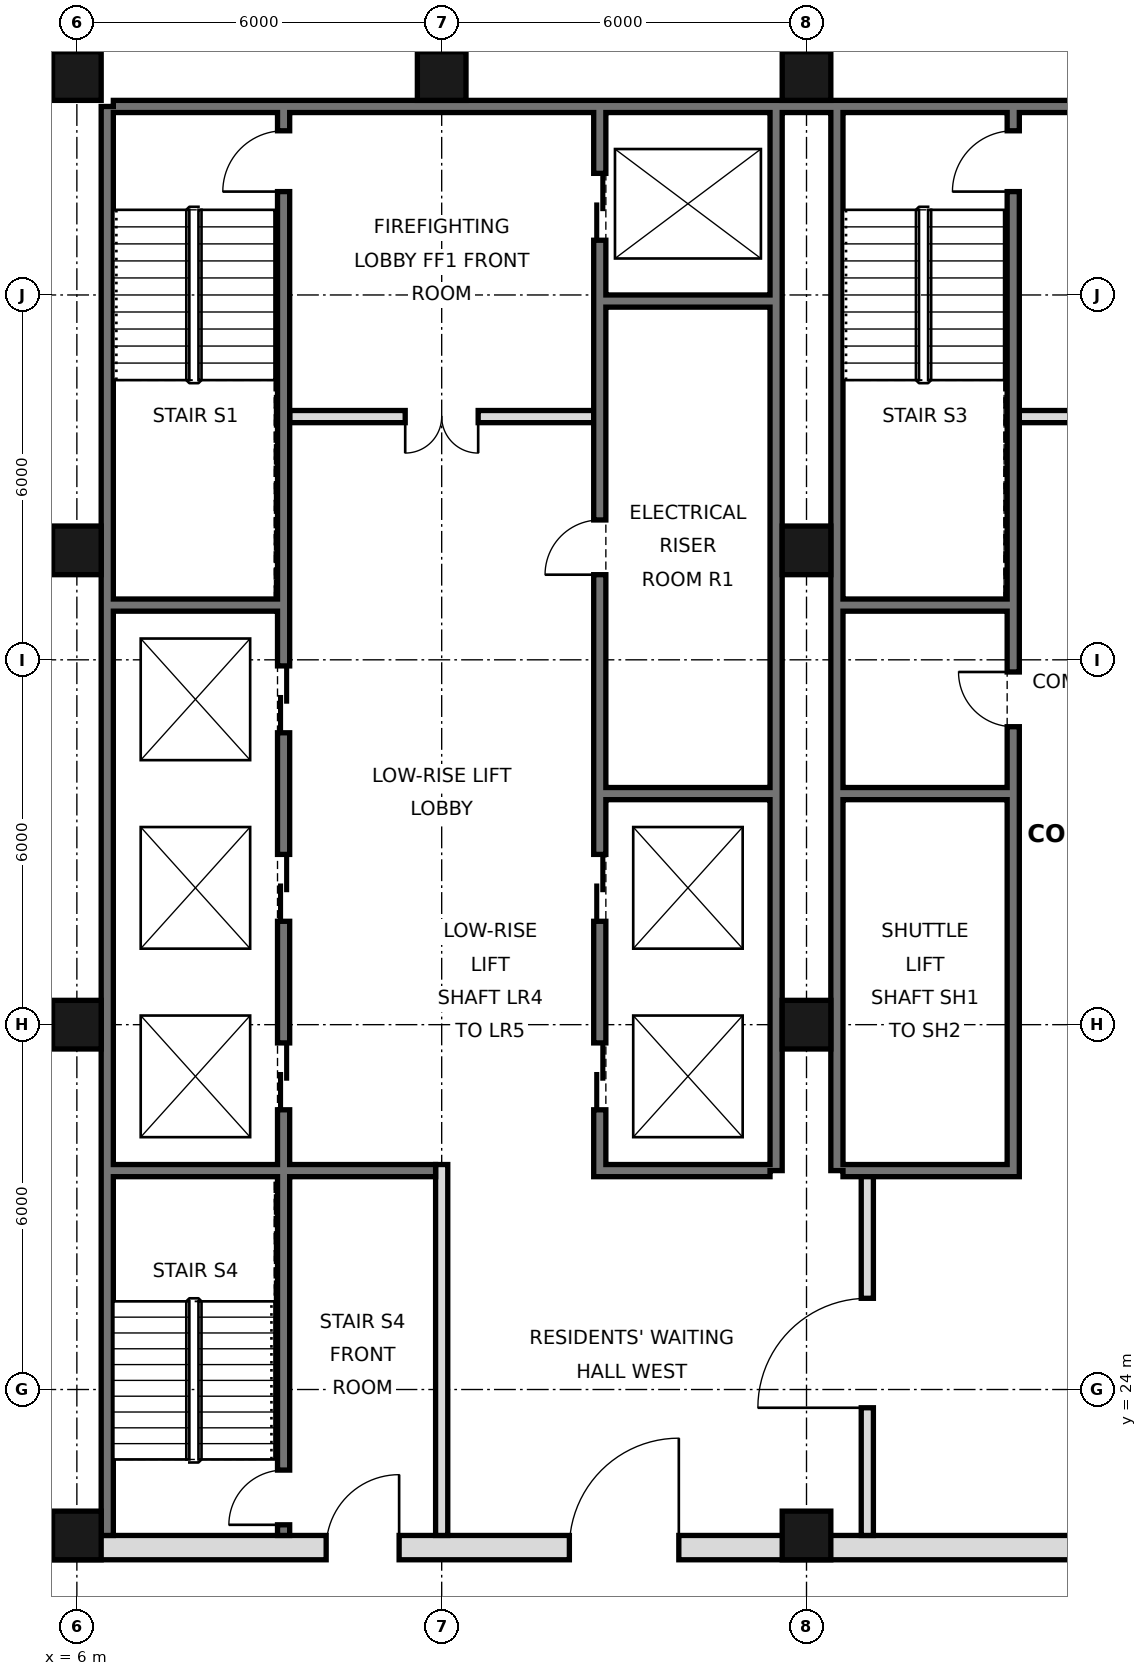
"""IFC4 building model, lengths in metres.
Left out: names, types, materials, properties, quantities, classifications, styles, units other than length and angle.
Written with IfcOpenShell. Run it as: python <this file> out.ifc"""

import sys

from ifc_helpers import new_model, si_unit, direction, frame, frame_2d, origin, origin_2d, place, context, subcontext, project, spatial, rectangle, hollow_rectangle, extrude, element, fill, save


model = new_model("IFC4")
c1 = context("Model", 3, precision=1e-05, world=origin(), true_north=direction((0.0, 1.0)))
c2 = subcontext(c1, "Body", "Model", "MODEL_VIEW")
j1 = project(units=[si_unit("LENGTHUNIT", "METRE"), si_unit("PLANEANGLEUNIT", "RADIAN")], contexts=[c1])
p1 = place(None, origin())
s1 = spatial("IfcSite", under=j1, at=p1, CompositionType="ELEMENT")
p2 = place(p1, origin())
s2 = spatial("IfcBuilding", under=s1, at=p2, CompositionType="ELEMENT")
p3 = place(p2, frame((0.0, 0.0, 126.8)))
s3 = spatial("IfcBuildingStorey", under=s2, at=p3, CompositionType="ELEMENT", Elevation=126.8)
for number, where, z_axis, x_axis in (
    (1, (6.0, 21.6, 0.0), (0.0, 0.0, 1.0), (1.0, 0.0, 0.0)),
    (2, (6.0, 30.0, 0.0), (0.0, 0.0, 1.0), (1.0, 0.0, 0.0)),
    (3, (6.0, 37.8, 0.0), (0.0, 0.0, 1.0), (1.0, 0.0, 0.0)),
    (4, (6.0, 45.6, 0.0), (0.0, 0.0, 1.0), (1.0, 0.0, 0.0)),
    (5, (12.0, 45.6, 0.0), (0.0, 0.0, 1.0), (1.0, 0.0, 0.0)),
    (6, (18.0, 21.6, 0.0), (0.0, 0.0, 1.0), (1.0, 0.0, 0.0)),
    (7, (18.0, 30.0, 0.0), (0.0, 0.0, 1.0), (1.0, 0.0, 0.0)),
    (8, (18.0, 37.8, 0.0), (0.0, 0.0, 1.0), (1.0, 0.0, 0.0)),
    (9, (18.0, 45.6, 0.0), (0.0, 0.0, 1.0), (1.0, 0.0, 0.0)),
):
    element("IfcColumn", number, at=place(p3, frame(where, z_axis=z_axis, x_axis=x_axis)), inside=s3, PredefinedType="COLUMN", context=c2, shape_type="SweptSolid", body=[
        extrude(hollow_rectangle(XDim=0.8, YDim=0.8, WallThickness=0.05, at=origin_2d()), origin(), (0.0, 0.0, 1.0), 3.6),
    ])
p4 = place(p3, frame((6.5, 21.6, 0.0), z_axis=(0.0, 0.0, 1.0), x_axis=(0.0, 1.0, 0.0)))
e10 = element("IfcWall", 10, at=p4, inside=s3, PredefinedType="SOLIDWALL", context=c2, shape_type="SweptSolid", body=[
    extrude(rectangle(XDim=23.5, YDim=0.2, at=frame_2d((11.75, 0.0))), origin(), (0.0, 0.0, 1.0), 3.42),
])
p5 = place(p3, frame((6.6, 45.1, 0.0), z_axis=(0.0, 0.0, 1.0), x_axis=(1.0, 0.0, 0.0)))
e11 = element("IfcWall", 11, at=p5, inside=s3, PredefinedType="SOLIDWALL", context=c2, shape_type="SweptSolid", body=[
    extrude(rectangle(XDim=34.8, YDim=0.2, at=frame_2d((17.4, 0.0))), origin(), (0.0, 0.0, 1.0), 3.42),
])
for number, where, z_axis, x_axis in (
    (12, (17.5, 27.6, 0.0), (0.0, 0.0, 1.0), (0.0, 1.0, 0.0)),
    (13, (18.5, 27.6, 0.0), (0.0, 0.0, 1.0), (0.0, 1.0, 0.0)),
):
    element("IfcWall", number, at=place(p3, frame(where, z_axis=z_axis, x_axis=x_axis)), inside=s3, PredefinedType="SOLIDWALL", context=c2, shape_type="SweptSolid", body=[
        extrude(rectangle(XDim=17.5, YDim=0.2, at=frame_2d((8.75, 0.0))), origin(), (0.0, 0.0, 1.0), 3.42),
    ])
p6 = place(p3, frame((5.6, 21.4, 0.0), z_axis=(0.0, 0.0, 1.0), x_axis=(1.0, 0.0, 0.0)))
e14 = element("IfcWall", 14, at=p6, inside=s3, PredefinedType="SOLIDWALL", context=c2, shape_type="SweptSolid", body=[
    extrude(rectangle(XDim=36.8, YDim=0.4, at=frame_2d((18.4, 0.0))), origin(), (0.0, 0.0, 1.0), 3.42),
])
p7 = place(p6, frame((8.5, 0.0, 0.0)))
e15 = element("IfcOpeningElement", 15, at=p7, cuts=e14, PredefinedType="OPENING", context=c2, shape_type="SweptSolid", body=[
    extrude(rectangle(XDim=1.8, YDim=2.1, at=frame_2d((0.9, 1.05))), frame((0.0, 0.21, 0.0), z_axis=(0.0, -1.0, 0.0), x_axis=(1.0, 0.0, 0.0)), (0.0, 0.0, 1.0), 0.42),
])
p8 = place(p6, frame((17.5, 0.0, 0.0)))
e16 = element("IfcOpeningElement", 16, at=p8, cuts=e14, PredefinedType="OPENING", context=c2, shape_type="SweptSolid", body=[
    extrude(rectangle(XDim=1.8, YDim=2.1, at=frame_2d((0.9, 1.05))), frame((0.0, 0.21, 0.0), z_axis=(0.0, -1.0, 0.0), x_axis=(1.0, 0.0, 0.0)), (0.0, 0.0, 1.0), 0.42),
])
p9 = place(p6, frame((26.5, 0.0, 0.0)))
e17 = element("IfcOpeningElement", 17, at=p9, cuts=e14, PredefinedType="OPENING", context=c2, shape_type="SweptSolid", body=[
    extrude(rectangle(XDim=1.8, YDim=2.1, at=frame_2d((0.9, 1.05))), frame((0.0, 0.21, 0.0), z_axis=(0.0, -1.0, 0.0), x_axis=(1.0, 0.0, 0.0)), (0.0, 0.0, 1.0), 0.42),
])
p10 = place(p6, frame((4.5, 0.0, 0.0)))
e18 = element("IfcOpeningElement", 18, at=p10, cuts=e14, PredefinedType="OPENING", context=c2, shape_type="SweptSolid", body=[
    extrude(rectangle(XDim=1.2, YDim=2.1, at=frame_2d((0.6, 1.05))), frame((0.0, 0.21, 0.0), z_axis=(0.0, -1.0, 0.0), x_axis=(1.0, 0.0, 0.0)), (0.0, 0.0, 1.0), 0.42),
])
p11 = place(p6, frame((31.1, 0.0, 0.0)))
e19 = element("IfcOpeningElement", 19, at=p11, cuts=e14, PredefinedType="OPENING", context=c2, shape_type="SweptSolid", body=[
    extrude(rectangle(XDim=1.2, YDim=2.1, at=frame_2d((0.6, 1.05))), frame((0.0, 0.21, 0.0), z_axis=(0.0, -1.0, 0.0), x_axis=(1.0, 0.0, 0.0)), (0.0, 0.0, 1.0), 0.42),
])
p12 = place(p3, frame((19.0, 21.6, 0.0), z_axis=(0.0, 0.0, 1.0), x_axis=(0.0, 1.0, 0.0)))
e20 = element("IfcWall", 20, at=p12, inside=s3, PredefinedType="PARTITIONING", context=c2, shape_type="SweptSolid", body=[
    extrude(rectangle(XDim=6.0, YDim=0.2, at=frame_2d((3.0, 0.0))), origin(), (0.0, 0.0, 1.0), 3.42),
])
p13 = place(p12, frame((2.1, 0.0, 0.0)))
e21 = element("IfcOpeningElement", 21, at=p13, cuts=e20, PredefinedType="OPENING", context=c2, shape_type="SweptSolid", body=[
    extrude(rectangle(XDim=1.8, YDim=2.1, at=frame_2d((0.9, 1.05))), frame((0.0, 0.11, 0.0), z_axis=(0.0, -1.0, 0.0), x_axis=(1.0, 0.0, 0.0)), (0.0, 0.0, 1.0), 0.22),
])
p14 = place(p3, frame((12.0, 21.6, 0.0), z_axis=(0.0, 0.0, 1.0), x_axis=(0.0, 1.0, 0.0)))
e22 = element("IfcWall", 22, at=p14, inside=s3, PredefinedType="PARTITIONING", context=c2, shape_type="SweptSolid", body=[
    extrude(rectangle(XDim=6.1, YDim=0.2, at=frame_2d((3.05, 0.0))), origin(), (0.0, 0.0, 1.0), 3.42),
])
p15 = place(p3, frame((14.6, 27.5, 0.0), z_axis=(0.0, 0.0, 1.0), x_axis=(0.0, 1.0, 0.0)))
e23 = element("IfcWall", 23, at=p15, inside=s3, PredefinedType="SOLIDWALL", context=c2, shape_type="SweptSolid", body=[
    extrude(rectangle(XDim=17.5, YDim=0.2, at=frame_2d((8.75, 0.0))), origin(), (0.0, 0.0, 1.0), 3.42),
])
p16 = place(p15, frame((1.1, 0.0, 0.0)))
e24 = element("IfcOpeningElement", 24, at=p16, cuts=e23, PredefinedType="OPENING", context=c2, shape_type="SweptSolid", body=[
    extrude(rectangle(XDim=1.1, YDim=2.1, at=frame_2d((0.55, 1.05))), frame((0.0, 0.11, 0.0), z_axis=(0.0, -1.0, 0.0), x_axis=(1.0, 0.0, 0.0)), (0.0, 0.0, 1.0), 0.22),
])
p17 = place(p15, frame((4.2, 0.0, 0.0)))
e25 = element("IfcOpeningElement", 25, at=p17, cuts=e23, PredefinedType="OPENING", context=c2, shape_type="SweptSolid", body=[
    extrude(rectangle(XDim=1.1, YDim=2.1, at=frame_2d((0.55, 1.05))), frame((0.0, 0.11, 0.0), z_axis=(0.0, -1.0, 0.0), x_axis=(1.0, 0.0, 0.0)), (0.0, 0.0, 1.0), 0.22),
])
p18 = place(p15, frame((15.4, 0.0, 0.0)))
e26 = element("IfcOpeningElement", 26, at=p18, cuts=e23, PredefinedType="OPENING", context=c2, shape_type="SweptSolid", body=[
    extrude(rectangle(XDim=1.1, YDim=2.1, at=frame_2d((0.55, 1.05))), frame((0.0, 0.11, 0.0), z_axis=(0.0, -1.0, 0.0), x_axis=(1.0, 0.0, 0.0)), (0.0, 0.0, 1.0), 0.22),
])
p19 = place(p15, frame((9.9, 0.0, 0.0)))
e27 = element("IfcOpeningElement", 27, at=p19, cuts=e23, PredefinedType="OPENING", context=c2, shape_type="SweptSolid", body=[
    extrude(rectangle(XDim=0.9, YDim=2.1, at=frame_2d((0.45, 1.05))), frame((0.0, 0.11, 0.0), z_axis=(0.0, -1.0, 0.0), x_axis=(1.0, 0.0, 0.0)), (0.0, 0.0, 1.0), 0.22),
])
p20 = place(p3, frame((21.4, 27.5, 0.0), z_axis=(0.0, 0.0, 1.0), x_axis=(0.0, 1.0, 0.0)))
e28 = element("IfcWall", 28, at=p20, inside=s3, PredefinedType="SOLIDWALL", context=c2, shape_type="SweptSolid", body=[
    extrude(rectangle(XDim=17.5, YDim=0.2, at=frame_2d((8.75, 0.0))), origin(), (0.0, 0.0, 1.0), 3.42),
])
p21 = place(p20, frame((16.2, 0.0, 0.0)))
e29 = element("IfcOpeningElement", 29, at=p21, cuts=e28, PredefinedType="OPENING", context=c2, shape_type="SweptSolid", body=[
    extrude(rectangle(XDim=1.0, YDim=2.1, at=frame_2d((0.5, 1.05))), frame((0.0, 0.11, 0.0), z_axis=(0.0, -1.0, 0.0), x_axis=(1.0, 0.0, 0.0)), (0.0, 0.0, 1.0), 0.22),
])
p22 = place(p20, frame((7.4, 0.0, 0.0)))
e30 = element("IfcOpeningElement", 30, at=p22, cuts=e28, PredefinedType="OPENING", context=c2, shape_type="SweptSolid", body=[
    extrude(rectangle(XDim=0.9, YDim=2.1, at=frame_2d((0.45, 1.05))), frame((0.0, 0.11, 0.0), z_axis=(0.0, -1.0, 0.0), x_axis=(1.0, 0.0, 0.0)), (0.0, 0.0, 1.0), 0.22),
])
p23 = place(p3, frame((9.4, 21.6, 0.0), z_axis=(0.0, 0.0, 1.0), x_axis=(0.0, 1.0, 0.0)))
e31 = element("IfcWall", 31, at=p23, inside=s3, PredefinedType="SOLIDWALL", context=c2, shape_type="SweptSolid", body=[
    extrude(rectangle(XDim=23.4, YDim=0.2, at=frame_2d((11.7, 0.0))), origin(), (0.0, 0.0, 1.0), 3.42),
])
p24 = place(p23, frame((7.0, 0.0, 0.0)))
e32 = element("IfcOpeningElement", 32, at=p24, cuts=e31, PredefinedType="OPENING", context=c2, shape_type="SweptSolid", body=[
    extrude(rectangle(XDim=1.1, YDim=2.1, at=frame_2d((0.55, 1.05))), frame((0.0, 0.11, 0.0), z_axis=(0.0, -1.0, 0.0), x_axis=(1.0, 0.0, 0.0)), (0.0, 0.0, 1.0), 0.22),
])
p25 = place(p23, frame((10.1, 0.0, 0.0)))
e33 = element("IfcOpeningElement", 33, at=p25, cuts=e31, PredefinedType="OPENING", context=c2, shape_type="SweptSolid", body=[
    extrude(rectangle(XDim=1.1, YDim=2.1, at=frame_2d((0.55, 1.05))), frame((0.0, 0.11, 0.0), z_axis=(0.0, -1.0, 0.0), x_axis=(1.0, 0.0, 0.0)), (0.0, 0.0, 1.0), 0.22),
])
p26 = place(p23, frame((13.2, 0.0, 0.0)))
e34 = element("IfcOpeningElement", 34, at=p26, cuts=e31, PredefinedType="OPENING", context=c2, shape_type="SweptSolid", body=[
    extrude(rectangle(XDim=1.1, YDim=2.1, at=frame_2d((0.55, 1.05))), frame((0.0, 0.11, 0.0), z_axis=(0.0, -1.0, 0.0), x_axis=(1.0, 0.0, 0.0)), (0.0, 0.0, 1.0), 0.22),
])
p27 = place(p23, frame((22.1, 0.0, 0.0)))
e35 = element("IfcOpeningElement", 35, at=p27, cuts=e31, PredefinedType="OPENING", context=c2, shape_type="SweptSolid", body=[
    extrude(rectangle(XDim=1.0, YDim=2.1, at=frame_2d((0.5, 1.05))), frame((0.0, 0.11, 0.0), z_axis=(0.0, -1.0, 0.0), x_axis=(1.0, 0.0, 0.0)), (0.0, 0.0, 1.0), 0.22),
])
p28 = place(p23, frame((0.175, 0.0, 0.0)))
e36 = element("IfcOpeningElement", 36, at=p28, cuts=e31, PredefinedType="OPENING", context=c2, shape_type="SweptSolid", body=[
    extrude(rectangle(XDim=0.9, YDim=2.1, at=frame_2d((0.45, 1.05))), frame((0.0, 0.11, 0.0), z_axis=(0.0, -1.0, 0.0), x_axis=(1.0, 0.0, 0.0)), (0.0, 0.0, 1.0), 0.22),
])
for number, where, z_axis, x_axis in (
    (37, (14.7, 27.6, 0.0), (0.0, 0.0, 1.0), (1.0, 0.0, 0.0)),
    (38, (18.6, 27.6, 0.0), (0.0, 0.0, 1.0), (1.0, 0.0, 0.0)),
):
    element("IfcWall", number, at=place(p3, frame(where, z_axis=z_axis, x_axis=x_axis)), inside=s3, PredefinedType="SOLIDWALL", context=c2, shape_type="SweptSolid", body=[
        extrude(rectangle(XDim=2.7, YDim=0.2, at=frame_2d((1.35, 0.0))), origin(), (0.0, 0.0, 1.0), 3.42),
    ])
p29 = place(p3, frame((6.6, 27.6, 0.0), z_axis=(0.0, 0.0, 1.0), x_axis=(1.0, 0.0, 0.0)))
e39 = element("IfcWall", 39, at=p29, inside=s3, PredefinedType="SOLIDWALL", context=c2, shape_type="SweptSolid", body=[
    extrude(rectangle(XDim=5.3, YDim=0.2, at=frame_2d((2.65, 0.0))), origin(), (0.0, 0.0, 1.0), 3.42),
])
for number, where, z_axis, x_axis in (
    (40, (14.7, 33.8, 0.0), (0.0, 0.0, 1.0), (1.0, 0.0, 0.0)),
    (41, (18.6, 33.8, 0.0), (0.0, 0.0, 1.0), (1.0, 0.0, 0.0)),
    (42, (18.6, 36.9, 0.0), (0.0, 0.0, 1.0), (1.0, 0.0, 0.0)),
    (43, (6.6, 36.9, 0.0), (0.0, 0.0, 1.0), (1.0, 0.0, 0.0)),
):
    element("IfcWall", number, at=place(p3, frame(where, z_axis=z_axis, x_axis=x_axis)), inside=s3, PredefinedType="SOLIDWALL", context=c2, shape_type="SweptSolid", body=[
        extrude(rectangle(XDim=2.7, YDim=0.2, at=frame_2d((1.35, 0.0))), origin(), (0.0, 0.0, 1.0), 3.42),
    ])
p30 = place(p3, frame((21.5, 40.0, 0.0), z_axis=(0.0, 0.0, 1.0), x_axis=(1.0, 0.0, 0.0)))
e44 = element("IfcWall", 44, at=p30, inside=s3, PredefinedType="PARTITIONING", context=c2, shape_type="SweptSolid", body=[
    extrude(rectangle(XDim=5.0, YDim=0.2, at=frame_2d((2.5, 0.0))), origin(), (0.0, 0.0, 1.0), 3.42),
])
p31 = place(p30, frame((1.9, 0.0, 0.0)))
e45 = element("IfcOpeningElement", 45, at=p31, cuts=e44, PredefinedType="OPENING", context=c2, shape_type="SweptSolid", body=[
    extrude(rectangle(XDim=1.2, YDim=2.1, at=frame_2d((0.6, 1.05))), frame((0.0, 0.11, 0.0), z_axis=(0.0, -1.0, 0.0), x_axis=(1.0, 0.0, 0.0)), (0.0, 0.0, 1.0), 0.22),
])
p32 = place(p3, frame((9.5, 40.0, 0.0), z_axis=(0.0, 0.0, 1.0), x_axis=(1.0, 0.0, 0.0)))
e46 = element("IfcWall", 46, at=p32, inside=s3, PredefinedType="PARTITIONING", context=c2, shape_type="SweptSolid", body=[
    extrude(rectangle(XDim=5.0, YDim=0.2, at=frame_2d((2.5, 0.0))), origin(), (0.0, 0.0, 1.0), 3.42),
])
p33 = place(p32, frame((1.9, 0.0, 0.0)))
e47 = element("IfcOpeningElement", 47, at=p33, cuts=e46, PredefinedType="OPENING", context=c2, shape_type="SweptSolid", body=[
    extrude(rectangle(XDim=1.2, YDim=2.1, at=frame_2d((0.6, 1.05))), frame((0.0, 0.11, 0.0), z_axis=(0.0, -1.0, 0.0), x_axis=(1.0, 0.0, 0.0)), (0.0, 0.0, 1.0), 0.22),
])
p34 = place(p3, frame((14.7, 41.9, 0.0), z_axis=(0.0, 0.0, 1.0), x_axis=(1.0, 0.0, 0.0)))
e48 = element("IfcWall", 48, at=p34, inside=s3, PredefinedType="SOLIDWALL", context=c2, shape_type="SweptSolid", body=[
    extrude(rectangle(XDim=2.7, YDim=0.2, at=frame_2d((1.35, 0.0))), origin(), (0.0, 0.0, 1.0), 3.42),
])
p35 = place(p7, frame((1.8, 0.0, 0.0), z_axis=(0.0, 0.0, 1.0), x_axis=(-1.0, 0.0, 0.0)))
e49 = element("IfcDoor", 49, at=p35, inside=s3, OperationType="SINGLE_SWING_LEFT", PredefinedType="DOOR", context=c2, shape_type="SweptSolid", body=[
    extrude(rectangle(XDim=1.8, YDim=2.1, at=frame_2d((0.9, 1.05))), frame((0.0, 0.025, 0.0), z_axis=(0.0, -1.0, 0.0), x_axis=(1.0, 0.0, 0.0)), (0.0, 0.0, 1.0), 0.05),
])
fill(e15, e49)
p36 = place(p13, origin())
e50 = element("IfcDoor", 50, at=p36, inside=s3, OperationType="SINGLE_SWING_LEFT", PredefinedType="DOOR", context=c2, shape_type="SweptSolid", body=[
    extrude(rectangle(XDim=1.8, YDim=2.1, at=frame_2d((0.9, 1.05))), frame((0.0, 0.025, 0.0), z_axis=(0.0, -1.0, 0.0), x_axis=(1.0, 0.0, 0.0)), (0.0, 0.0, 1.0), 0.05),
])
fill(e21, e50)
p37 = place(p10, frame((1.2, 0.0, 0.0), z_axis=(0.0, 0.0, 1.0), x_axis=(-1.0, 0.0, 0.0)))
e51 = element("IfcDoor", 51, at=p37, inside=s3, OperationType="SINGLE_SWING_LEFT", PredefinedType="DOOR", context=c2, shape_type="SweptSolid", body=[
    extrude(rectangle(XDim=1.2, YDim=2.1, at=frame_2d((0.6, 1.05))), frame((0.0, 0.025, 0.0), z_axis=(0.0, -1.0, 0.0), x_axis=(1.0, 0.0, 0.0)), (0.0, 0.0, 1.0), 0.05),
])
fill(e18, e51)
p38 = place(p33, frame((1.2, 0.0, 0.0), z_axis=(0.0, 0.0, 1.0), x_axis=(-1.0, 0.0, 0.0)))
e52 = element("IfcDoor", 52, at=p38, inside=s3, OperationType="DOUBLE_DOOR_SINGLE_SWING", PredefinedType="DOOR", context=c2, shape_type="SweptSolid", body=[
    extrude(rectangle(XDim=1.2, YDim=2.1, at=frame_2d((0.6, 1.05))), frame((0.0, 0.025, 0.0), z_axis=(0.0, -1.0, 0.0), x_axis=(1.0, 0.0, 0.0)), (0.0, 0.0, 1.0), 0.05),
])
fill(e47, e52)
p39 = place(p16, origin())
e53 = element("IfcDoor", 53, at=p39, inside=s3, OperationType="DOUBLE_DOOR_SLIDING", PredefinedType="DOOR", context=c2, shape_type="SweptSolid", body=[
    extrude(rectangle(XDim=1.1, YDim=2.1, at=frame_2d((0.55, 1.05))), frame((0.0, 0.025, 0.0), z_axis=(0.0, -1.0, 0.0), x_axis=(1.0, 0.0, 0.0)), (0.0, 0.0, 1.0), 0.05),
])
fill(e24, e53)
p40 = place(p17, origin())
e54 = element("IfcDoor", 54, at=p40, inside=s3, OperationType="DOUBLE_DOOR_SLIDING", PredefinedType="DOOR", context=c2, shape_type="SweptSolid", body=[
    extrude(rectangle(XDim=1.1, YDim=2.1, at=frame_2d((0.55, 1.05))), frame((0.0, 0.025, 0.0), z_axis=(0.0, -1.0, 0.0), x_axis=(1.0, 0.0, 0.0)), (0.0, 0.0, 1.0), 0.05),
])
fill(e25, e54)
p41 = place(p18, origin())
e55 = element("IfcDoor", 55, at=p41, inside=s3, OperationType="DOUBLE_DOOR_SLIDING", PredefinedType="DOOR", context=c2, shape_type="SweptSolid", body=[
    extrude(rectangle(XDim=1.1, YDim=2.1, at=frame_2d((0.55, 1.05))), frame((0.0, 0.025, 0.0), z_axis=(0.0, -1.0, 0.0), x_axis=(1.0, 0.0, 0.0)), (0.0, 0.0, 1.0), 0.05),
])
fill(e26, e55)
p42 = place(p24, origin())
e56 = element("IfcDoor", 56, at=p42, inside=s3, OperationType="DOUBLE_DOOR_SLIDING", PredefinedType="DOOR", context=c2, shape_type="SweptSolid", body=[
    extrude(rectangle(XDim=1.1, YDim=2.1, at=frame_2d((0.55, 1.05))), frame((0.0, 0.025, 0.0), z_axis=(0.0, -1.0, 0.0), x_axis=(1.0, 0.0, 0.0)), (0.0, 0.0, 1.0), 0.05),
])
fill(e32, e56)
p43 = place(p25, origin())
e57 = element("IfcDoor", 57, at=p43, inside=s3, OperationType="DOUBLE_DOOR_SLIDING", PredefinedType="DOOR", context=c2, shape_type="SweptSolid", body=[
    extrude(rectangle(XDim=1.1, YDim=2.1, at=frame_2d((0.55, 1.05))), frame((0.0, 0.025, 0.0), z_axis=(0.0, -1.0, 0.0), x_axis=(1.0, 0.0, 0.0)), (0.0, 0.0, 1.0), 0.05),
])
fill(e33, e57)
p44 = place(p26, origin())
e58 = element("IfcDoor", 58, at=p44, inside=s3, OperationType="DOUBLE_DOOR_SLIDING", PredefinedType="DOOR", context=c2, shape_type="SweptSolid", body=[
    extrude(rectangle(XDim=1.1, YDim=2.1, at=frame_2d((0.55, 1.05))), frame((0.0, 0.025, 0.0), z_axis=(0.0, -1.0, 0.0), x_axis=(1.0, 0.0, 0.0)), (0.0, 0.0, 1.0), 0.05),
])
fill(e34, e58)
p45 = place(p27, origin())
e59 = element("IfcDoor", 59, at=p45, inside=s3, OperationType="SINGLE_SWING_LEFT", PredefinedType="DOOR", context=c2, shape_type="SweptSolid", body=[
    extrude(rectangle(XDim=1.0, YDim=2.1, at=frame_2d((0.5, 1.05))), frame((0.0, 0.025, 0.0), z_axis=(0.0, -1.0, 0.0), x_axis=(1.0, 0.0, 0.0)), (0.0, 0.0, 1.0), 0.05),
])
fill(e35, e59)
p46 = place(p21, origin())
e60 = element("IfcDoor", 60, at=p46, inside=s3, OperationType="SINGLE_SWING_LEFT", PredefinedType="DOOR", context=c2, shape_type="SweptSolid", body=[
    extrude(rectangle(XDim=1.0, YDim=2.1, at=frame_2d((0.5, 1.05))), frame((0.0, 0.025, 0.0), z_axis=(0.0, -1.0, 0.0), x_axis=(1.0, 0.0, 0.0)), (0.0, 0.0, 1.0), 0.05),
])
fill(e29, e60)
p47 = place(p28, origin())
e61 = element("IfcDoor", 61, at=p47, inside=s3, OperationType="SINGLE_SWING_LEFT", PredefinedType="DOOR", context=c2, shape_type="SweptSolid", body=[
    extrude(rectangle(XDim=0.9, YDim=2.1, at=frame_2d((0.45, 1.05))), frame((0.0, 0.025, 0.0), z_axis=(0.0, -1.0, 0.0), x_axis=(1.0, 0.0, 0.0)), (0.0, 0.0, 1.0), 0.05),
])
fill(e36, e61)
p48 = place(p19, origin())
e62 = element("IfcDoor", 62, at=p48, inside=s3, OperationType="SINGLE_SWING_LEFT", PredefinedType="DOOR", context=c2, shape_type="SweptSolid", body=[
    extrude(rectangle(XDim=0.9, YDim=2.1, at=frame_2d((0.45, 1.05))), frame((0.0, 0.025, 0.0), z_axis=(0.0, -1.0, 0.0), x_axis=(1.0, 0.0, 0.0)), (0.0, 0.0, 1.0), 0.05),
])
fill(e27, e62)
p49 = place(p22, frame((0.9, 0.0, 0.0), z_axis=(0.0, 0.0, 1.0), x_axis=(-1.0, 0.0, 0.0)))
e63 = element("IfcDoor", 63, at=p49, inside=s3, OperationType="SINGLE_SWING_LEFT", PredefinedType="DOOR", context=c2, shape_type="SweptSolid", body=[
    extrude(rectangle(XDim=0.9, YDim=2.1, at=frame_2d((0.45, 1.05))), frame((0.0, 0.025, 0.0), z_axis=(0.0, -1.0, 0.0), x_axis=(1.0, 0.0, 0.0)), (0.0, 0.0, 1.0), 0.05),
])
fill(e30, e63)
save(model, sys.argv[1])
